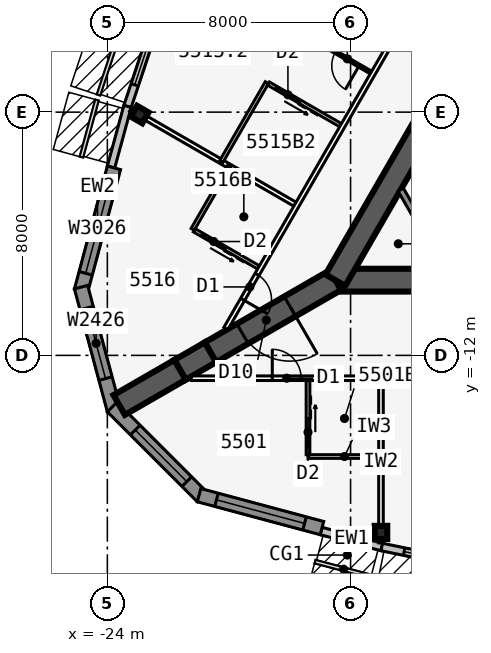
"""IFC4 building model, lengths in metres.
Left out: names, types, materials, properties, quantities, classifications, styles, units other than length and angle.
Written with IfcOpenShell. Run it as: python <this file> out.ifc"""

import sys

from ifc_helpers import new_model, si_unit, direction, frame, frame_2d, origin, origin_2d, place, context, subcontext, project, spatial, polyline, rectangle, i_section, outline, extrude, element, fill, save


model = new_model("IFC4")
c1 = context("Model", 3, precision=1e-05, world=origin(), true_north=direction((0.0, 1.0)))
c2 = subcontext(c1, "Body", "Model", "MODEL_VIEW")
j1 = project(units=[si_unit("LENGTHUNIT", "METRE"), si_unit("PLANEANGLEUNIT", "RADIAN")], contexts=[c1])
p1 = place(None, origin())
s1 = spatial("IfcSite", under=j1, at=p1, CompositionType="ELEMENT")
p2 = place(p1, origin())
s2 = spatial("IfcBuilding", under=s1, at=p2, CompositionType="ELEMENT")
p3 = place(p2, frame((0.0, 0.0, 208.1)))
s3 = spatial("IfcBuildingStorey", under=s2, at=p3, CompositionType="ELEMENT", Elevation=208.1)
p4 = place(p3, frame((-16.5, -9.526, 0.0), z_axis=(0.0, 0.0, 1.0), x_axis=(1.0, 0.0, 0.0)))
e1 = element("IfcWall", 1, at=p4, inside=s3, PredefinedType="SHEAR", context=c2, shape_type="SweptSolid", body=[
    extrude(rectangle(XDim=33.0, YDim=0.75, at=frame_2d((16.5, 0.0))), origin(), (0.0, 0.0, 1.0), 3.6),
])
p5 = place(p4, frame((14.05, 0.0, 0.0)))
e2 = element("IfcOpeningElement", 2, at=p5, cuts=e1, PredefinedType="OPENING", context=c2, shape_type="SweptSolid", body=[
    extrude(rectangle(XDim=1.8, YDim=2.13, at=frame_2d((0.9, 1.065))), frame((0.0, 0.385, 0.0), z_axis=(0.0, -1.0, 0.0), x_axis=(1.0, 0.0, 0.0)), (0.0, 0.0, 1.0), 0.77),
])
p6 = place(p3, frame((0.0, 19.052, 0.0), z_axis=(0.0, 0.0, 1.0), x_axis=(-0.499999749417, -0.866025548458, 0.0)))
e3 = element("IfcWall", 3, at=p6, inside=s3, PredefinedType="SHEAR", context=c2, shape_type="SweptSolid", body=[
    extrude(rectangle(XDim=33.0, YDim=0.75, at=frame_2d((16.5, 0.0))), origin(), (0.0, 0.0, 1.0), 3.6),
])
p7 = place(p6, frame((14.15, 0.0, 0.0)))
e4 = element("IfcOpeningElement", 4, at=p7, cuts=e3, PredefinedType="OPENING", context=c2, shape_type="SweptSolid", body=[
    extrude(rectangle(XDim=1.8, YDim=2.13, at=frame_2d((0.9, 1.065))), frame((0.0, 0.385, 0.0), z_axis=(0.0, -1.0, 0.0), x_axis=(1.0, 0.0, 0.0)), (0.0, 0.0, 1.0), 0.77),
])
p8 = place(p6, frame((12.6, 0.0, 0.0)))
e5 = element("IfcOpeningElement", 5, at=p8, cuts=e3, PredefinedType="OPENING", context=c2, shape_type="SweptSolid", body=[
    extrude(rectangle(XDim=1.0, YDim=2.13, at=frame_2d((0.5, 1.065))), frame((0.0, 0.385, 0.0), z_axis=(0.0, -1.0, 0.0), x_axis=(1.0, 0.0, 0.0)), (0.0, 0.0, 1.0), 0.77),
])
p9 = place(p3, frame((-16.5, -9.526, 0.0), z_axis=(0.0, 0.0, 1.0), x_axis=(-0.866031398331, -0.499989616998, 0.0)))
e6 = element("IfcWall", 6, at=p9, inside=s3, PredefinedType="SHEAR", context=c2, shape_type="SweptSolid", body=[
    extrude(rectangle(XDim=4.746, YDim=0.75, at=frame_2d((2.373, 0.0))), origin(), (0.0, 0.0, 1.0), 3.6),
])
p10 = place(p9, frame((1.725, 0.0, 0.0)))
e7 = element("IfcOpeningElement", 7, at=p10, cuts=e6, PredefinedType="OPENING", context=c2, shape_type="SweptSolid", body=[
    extrude(rectangle(XDim=1.8, YDim=2.13, at=frame_2d((0.9, 1.065))), frame((0.0, 0.385, 0.0), z_axis=(0.0, -1.0, 0.0), x_axis=(1.0, 0.0, 0.0)), (0.0, 0.0, 1.0), 0.77),
])
p11 = place(p3, frame((-20.61, -11.899, 0.0), z_axis=(0.0, 0.0, 1.0), x_axis=(-0.866009537788, -0.500027479704, 0.0)))
e8 = element("IfcWall", 8, at=p11, inside=s3, PredefinedType="SHEAR", context=c2, shape_type="SweptSolid", body=[
    extrude(rectangle(XDim=1.155, YDim=0.75, at=frame_2d((0.577, 0.0))), origin(), (0.0, 0.0, 1.0), 3.6),
])
p12 = place(p3, frame((-21.61, -12.477, 0.0), z_axis=(0.0, 0.0, 1.0), x_axis=(-0.866055313784, -0.499948190782, 0.0)))
e9 = element("IfcWall", 9, at=p12, inside=s3, PredefinedType="SHEAR", context=c2, shape_type="SweptSolid", body=[
    extrude(rectangle(XDim=2.309, YDim=0.75, at=frame_2d((1.155, 0.0))), origin(), (0.0, 0.0, 1.0), 3.6),
])
for number, where, z_axis, x_axis in (
    (10, (-15.0, -17.825, 0.0), (0.0, 0.0, 1.0), (1.0, 0.0, 0.0)),
    (11, (-22.937, -4.078, 0.0), (0.0, 0.0, 1.0), (-0.5, -0.866, 0.0)),
):
    element("IfcColumn", number, at=place(p3, frame(where, z_axis=z_axis, x_axis=x_axis)), inside=s3, PredefinedType="COLUMN", context=c2, shape_type="SweptSolid", body=[
        extrude(i_section(OverallWidth=0.411, OverallDepth=0.434, WebThickness=0.036, FlangeThickness=0.057, at=origin_2d()), origin(), (0.0, 0.0, 1.0), 3.6),
    ])
p13 = place(p3, frame((-16.968, -17.777, 0.0), z_axis=(0.0, 0.0, 1.0), x_axis=(0.967010286052, -0.254737328772, 0.0)))
e12 = element("IfcWall", 12, at=p13, inside=s3, PredefinedType="STANDARD", context=c2, shape_type="SweptSolid", body=[
    extrude(rectangle(XDim=2.068, YDim=0.25, at=frame_2d((1.034, 0.0))), origin(), (0.0, 0.0, 1.0), 3.435),
])
p14 = place(p3, frame((-14.975, -18.302, 0.0), z_axis=(0.0, 0.0, 1.0), x_axis=(0.979461488189, -0.201631329795, 0.0)))
e13 = element("IfcWall", 13, at=p14, inside=s3, PredefinedType="STANDARD", context=c2, shape_type="SweptSolid", body=[
    extrude(rectangle(XDim=5.105, YDim=0.25, at=frame_2d((2.552, 0.0))), origin(), (0.0, 0.0, 1.0), 3.435),
])
p15 = place(p14, frame((0.752, 0.0, 0.45)))
e14 = element("IfcOpeningElement", 14, at=p15, cuts=e13, PredefinedType="OPENING", context=c2, shape_type="SweptSolid", body=[
    extrude(rectangle(XDim=3.6, YDim=2.6, at=frame_2d((1.8, 1.3))), frame((0.0, 0.135, 0.0), z_axis=(0.0, -1.0, 0.0), x_axis=(1.0, 0.0, 0.0)), (0.0, 0.0, 1.0), 0.27),
])
p16 = place(p3, frame((-21.729, 1.028, 0.0), z_axis=(0.0, 0.0, 1.0), x_axis=(-0.315108478109, -0.949055660656, 0.0)))
e15 = element("IfcWall", 15, at=p16, inside=s3, PredefinedType="STANDARD", context=c2, shape_type="SweptSolid", body=[
    extrude(rectangle(XDim=5.105, YDim=0.25, at=frame_2d((2.552, 0.0))), origin(), (0.0, 0.0, 1.0), 3.435),
])
p17 = place(p16, frame((0.752, 0.0, 0.45)))
e16 = element("IfcOpeningElement", 16, at=p17, cuts=e15, PredefinedType="OPENING", context=c2, shape_type="SweptSolid", body=[
    extrude(rectangle(XDim=3.6, YDim=2.6, at=frame_2d((1.8, 1.3))), frame((0.0, 0.135, 0.0), z_axis=(0.0, -1.0, 0.0), x_axis=(1.0, 0.0, 0.0)), (0.0, 0.0, 1.0), 0.27),
])
p18 = place(p3, frame((-23.336, -3.811, 0.0), z_axis=(0.0, 0.0, 1.0), x_axis=(-0.262867703986, -0.964831887015, 0.0)))
e17 = element("IfcWall", 17, at=p18, inside=s3, PredefinedType="STANDARD", context=c2, shape_type="SweptSolid", body=[
    extrude(rectangle(XDim=2.068, YDim=0.25, at=frame_2d((1.034, 0.0))), origin(), (0.0, 0.0, 1.0), 3.435),
])
p19 = place(p3, frame((-23.783, -5.832, 0.0), z_axis=(0.0, 0.0, 1.0), x_axis=(-0.258784695888, -0.965935029479, 0.0)))
e18 = element("IfcWall", 18, at=p19, inside=s3, PredefinedType="SOLIDWALL", context=c2, shape_type="SweptSolid", body=[
    extrude(rectangle(XDim=4.184, YDim=0.45, at=frame_2d((2.092, 0.0))), origin(), (0.0, 0.0, 1.0), 3.435),
])
p20 = place(p19, frame((0.592, 0.0, 0.45)))
e19 = element("IfcOpeningElement", 19, at=p20, cuts=e18, PredefinedType="OPENING", context=c2, shape_type="SweptSolid", body=[
    extrude(rectangle(XDim=3.0, YDim=2.6, at=frame_2d((1.5, 1.3))), frame((0.0, 0.235, 0.0), z_axis=(0.0, -1.0, 0.0), x_axis=(1.0, 0.0, 0.0)), (0.0, 0.0, 1.0), 0.47),
])
p21 = place(p3, frame((-24.865, -9.757, 0.0), z_axis=(0.0, 0.0, 1.0), x_axis=(0.258799282522, -0.96593112144, 0.0)))
e20 = element("IfcWall", 20, at=p21, inside=s3, PredefinedType="SOLIDWALL", context=c2, shape_type="SweptSolid", body=[
    extrude(outline(polyline([(4.184, 0.225), (4.125, 0.225), (3.705, 0.113), (3.675, 0.225), (0.0, 0.225), (0.0, -0.225), (4.184, -0.225), (4.184, 0.225)])), origin(), (0.0, 0.0, 1.0), 3.435),
])
p22 = place(p21, frame((0.713, 0.0, 0.45)))
e21 = element("IfcOpeningElement", 21, at=p22, cuts=e20, PredefinedType="OPENING", context=c2, shape_type="SweptSolid", body=[
    extrude(rectangle(XDim=2.4, YDim=2.6, at=frame_2d((1.2, 1.3))), frame((0.0, 0.235, 0.0), z_axis=(0.0, -1.0, 0.0), x_axis=(1.0, 0.0, 0.0)), (0.0, 0.0, 1.0), 0.47),
])
p23 = place(p3, frame((-23.841, -13.697, 0.0), z_axis=(0.0, 0.0, 1.0), x_axis=(0.707077605902, -0.707135955267, 0.0)))
e22 = element("IfcWall", 22, at=p23, inside=s3, PredefinedType="SOLIDWALL", context=c2, shape_type="SweptSolid", body=[
    extrude(outline(polyline([(4.184, 0.225), (0.509, 0.225), (0.479, 0.113), (0.059, 0.225), (0.0, 0.225), (0.0, -0.225), (4.184, -0.225), (4.184, 0.225)])), origin(), (0.0, 0.0, 1.0), 3.435),
])
p24 = place(p23, frame((1.071, 0.0, 0.45)))
e23 = element("IfcOpeningElement", 23, at=p24, cuts=e22, PredefinedType="OPENING", context=c2, shape_type="SweptSolid", body=[
    extrude(rectangle(XDim=2.4, YDim=2.6, at=frame_2d((1.2, 1.3))), frame((0.0, 0.235, 0.0), z_axis=(0.0, -1.0, 0.0), x_axis=(1.0, 0.0, 0.0)), (0.0, 0.0, 1.0), 0.47),
])
p25 = place(p3, frame((-20.983, -16.598, 0.0), z_axis=(0.0, 0.0, 1.0), x_axis=(0.965920442324, -0.258839137498, 0.0)))
e24 = element("IfcWall", 24, at=p25, inside=s3, PredefinedType="SOLIDWALL", context=c2, shape_type="SweptSolid", body=[
    extrude(rectangle(XDim=4.184, YDim=0.45, at=frame_2d((2.092, 0.0))), origin(), (0.0, 0.0, 1.0), 3.435),
])
p26 = place(p25, frame((0.592, 0.0, 0.45)))
e25 = element("IfcOpeningElement", 25, at=p26, cuts=e24, PredefinedType="OPENING", context=c2, shape_type="SweptSolid", body=[
    extrude(rectangle(XDim=3.0, YDim=2.6, at=frame_2d((1.5, 1.3))), frame((0.0, 0.235, 0.0), z_axis=(0.0, -1.0, 0.0), x_axis=(1.0, 0.0, 0.0)), (0.0, 0.0, 1.0), 0.47),
])
p27 = place(p3, frame((-21.236, -12.751, 0.0), z_axis=(0.0, 0.0, 1.0), x_axis=(1.0, 0.0, 0.0)))
e26 = element("IfcWall", 26, at=p27, inside=s3, PredefinedType="PARTITIONING", context=c2, shape_type="SweptSolid", body=[
    extrude(rectangle(XDim=42.472, YDim=0.15, at=frame_2d((21.236, 0.0))), origin(), (0.0, 0.0, 1.0), 3.435),
])
p28 = place(p27, frame((2.661, 0.0, 0.0)))
e27 = element("IfcOpeningElement", 27, at=p28, cuts=e26, PredefinedType="OPENING", context=c2, shape_type="SweptSolid", body=[
    extrude(rectangle(XDim=0.95, YDim=2.13, at=frame_2d((0.475, 1.065))), frame((0.0, 0.085, 0.0), z_axis=(0.0, -1.0, 0.0), x_axis=(1.0, 0.0, 0.0)), (0.0, 0.0, 1.0), 0.17),
])
p29 = place(p27, frame((8.261, 0.0, 0.0)))
e28 = element("IfcOpeningElement", 28, at=p29, cuts=e26, PredefinedType="OPENING", context=c2, shape_type="SweptSolid", body=[
    extrude(rectangle(XDim=0.95, YDim=2.13, at=frame_2d((0.475, 1.065))), frame((0.0, 0.085, 0.0), z_axis=(0.0, -1.0, 0.0), x_axis=(1.0, 0.0, 0.0)), (0.0, 0.0, 1.0), 0.17),
])
p30 = place(p27, frame((18.861, 0.0, 0.0)))
e29 = element("IfcOpeningElement", 29, at=p30, cuts=e26, PredefinedType="OPENING", context=c2, shape_type="SweptSolid", body=[
    extrude(rectangle(XDim=0.95, YDim=2.13, at=frame_2d((0.475, 1.065))), frame((0.0, 0.085, 0.0), z_axis=(0.0, -1.0, 0.0), x_axis=(1.0, 0.0, 0.0)), (0.0, 0.0, 1.0), 0.17),
])
p31 = place(p27, frame((23.236, 0.0, 0.0)))
e30 = element("IfcOpeningElement", 30, at=p31, cuts=e26, PredefinedType="OPENING", context=c2, shape_type="SweptSolid", body=[
    extrude(rectangle(XDim=1.0, YDim=2.13, at=frame_2d((0.5, 1.065))), frame((0.0, 0.085, 0.0), z_axis=(0.0, -1.0, 0.0), x_axis=(1.0, 0.0, 0.0)), (0.0, 0.0, 1.0), 0.17),
])
p32 = place(p27, frame((29.461, 0.0, 0.0)))
e31 = element("IfcOpeningElement", 31, at=p32, cuts=e26, PredefinedType="OPENING", context=c2, shape_type="SweptSolid", body=[
    extrude(rectangle(XDim=0.95, YDim=2.13, at=frame_2d((0.475, 1.065))), frame((0.0, 0.085, 0.0), z_axis=(0.0, -1.0, 0.0), x_axis=(1.0, 0.0, 0.0)), (0.0, 0.0, 1.0), 0.17),
])
p33 = place(p27, frame((38.861, 0.0, 0.0)))
e32 = element("IfcOpeningElement", 32, at=p33, cuts=e26, PredefinedType="OPENING", context=c2, shape_type="SweptSolid", body=[
    extrude(rectangle(XDim=0.95, YDim=2.13, at=frame_2d((0.475, 1.065))), frame((0.0, 0.085, 0.0), z_axis=(0.0, -1.0, 0.0), x_axis=(1.0, 0.0, 0.0)), (0.0, 0.0, 1.0), 0.17),
])
p34 = place(p3, frame((-15.0, -12.826, 0.0), z_axis=(0.0, 0.0, 1.0), x_axis=(0.0, -1.0, 0.0)))
e33 = element("IfcWall", 33, at=p34, inside=s3, PredefinedType="PARTITIONING", context=c2, shape_type="SweptSolid", body=[
    extrude(rectangle(XDim=5.34, YDim=0.15, at=frame_2d((2.67, 0.0))), origin(), (0.0, 0.0, 1.0), 2.589),
])
p35 = place(p3, frame((-17.4, -15.326, 0.0), z_axis=(0.0, 0.0, 1.0), x_axis=(1.0, 0.0, 0.0)))
e34 = element("IfcWall", 34, at=p35, inside=s3, PredefinedType="PLUMBINGWALL", context=c2, shape_type="SweptSolid", body=[
    extrude(rectangle(XDim=2.4, YDim=0.12, at=frame_2d((1.2, 0.0))), origin(), (0.0, 0.0, 1.0), 3.435),
])
p36 = place(p3, frame((-17.4, -12.826, 0.0), z_axis=(0.0, 0.0, 1.0), x_axis=(0.0, -1.0, 0.0)))
e35 = element("IfcWall", 35, at=p36, inside=s3, PredefinedType="PLUMBINGWALL", context=c2, shape_type="SweptSolid", body=[
    extrude(rectangle(XDim=2.44, YDim=0.12, at=frame_2d((1.22, 0.0))), origin(), (0.0, 0.0, 1.0), 3.435),
])
p37 = place(p36, frame((1.25, 0.0, 0.0)))
e36 = element("IfcOpeningElement", 36, at=p37, cuts=e35, PredefinedType="OPENING", context=c2, shape_type="SweptSolid", body=[
    extrude(rectangle(XDim=0.9, YDim=2.13, at=frame_2d((0.45, 1.065))), frame((0.0, 0.07, 0.0), z_axis=(0.0, -1.0, 0.0), x_axis=(1.0, 0.0, 0.0)), (0.0, 0.0, 1.0), 0.14),
])
p38 = place(p3, frame((-0.425, 22.966, 0.0), z_axis=(0.0, 0.0, 1.0), x_axis=(-0.500000265775, -0.866025250339, 0.0)))
e37 = element("IfcWall", 37, at=p38, inside=s3, PredefinedType="PARTITIONING", context=c2, shape_type="SweptSolid", body=[
    extrude(rectangle(XDim=39.354, YDim=0.15, at=frame_2d((19.677, 0.0))), origin(), (0.0, 0.0, 1.0), 3.435),
])
p39 = place(p38, frame((1.102, 0.0, 0.0)))
e38 = element("IfcOpeningElement", 38, at=p39, cuts=e37, PredefinedType="OPENING", context=c2, shape_type="SweptSolid", body=[
    extrude(rectangle(XDim=0.95, YDim=2.13, at=frame_2d((0.475, 1.065))), frame((0.0, 0.085, 0.0), z_axis=(0.0, -1.0, 0.0), x_axis=(1.0, 0.0, 0.0)), (0.0, 0.0, 1.0), 0.17),
])
p40 = place(p38, frame((7.902, 0.0, 0.0)))
e39 = element("IfcOpeningElement", 39, at=p40, cuts=e37, PredefinedType="OPENING", context=c2, shape_type="SweptSolid", body=[
    extrude(rectangle(XDim=0.95, YDim=2.13, at=frame_2d((0.475, 1.065))), frame((0.0, 0.085, 0.0), z_axis=(0.0, -1.0, 0.0), x_axis=(1.0, 0.0, 0.0)), (0.0, 0.0, 1.0), 0.17),
])
p41 = place(p38, frame((17.302, 0.0, 0.0)))
e40 = element("IfcOpeningElement", 40, at=p41, cuts=e37, PredefinedType="OPENING", context=c2, shape_type="SweptSolid", body=[
    extrude(rectangle(XDim=0.95, YDim=2.13, at=frame_2d((0.475, 1.065))), frame((0.0, 0.085, 0.0), z_axis=(0.0, -1.0, 0.0), x_axis=(1.0, 0.0, 0.0)), (0.0, 0.0, 1.0), 0.17),
])
p42 = place(p38, frame((26.702, 0.0, 0.0)))
e41 = element("IfcOpeningElement", 41, at=p42, cuts=e37, PredefinedType="OPENING", context=c2, shape_type="SweptSolid", body=[
    extrude(rectangle(XDim=0.95, YDim=2.13, at=frame_2d((0.475, 1.065))), frame((0.0, 0.085, 0.0), z_axis=(0.0, -1.0, 0.0), x_axis=(1.0, 0.0, 0.0)), (0.0, 0.0, 1.0), 0.17),
])
p43 = place(p38, frame((37.302, 0.0, 0.0)))
e42 = element("IfcOpeningElement", 42, at=p43, cuts=e37, PredefinedType="OPENING", context=c2, shape_type="SweptSolid", body=[
    extrude(rectangle(XDim=0.95, YDim=2.13, at=frame_2d((0.475, 1.065))), frame((0.0, 0.085, 0.0), z_axis=(0.0, -1.0, 0.0), x_axis=(1.0, 0.0, 0.0)), (0.0, 0.0, 1.0), 0.17),
])
p44 = place(p3, frame((-15.329, -2.697, 0.0), z_axis=(0.0, 0.0, 1.0), x_axis=(-0.866032413668, 0.499987858329, 0.0)))
e43 = element("IfcWall", 43, at=p44, inside=s3, PredefinedType="PARTITIONING", context=c2, shape_type="SweptSolid", body=[
    extrude(rectangle(XDim=7.273, YDim=0.1, at=frame_2d((3.636, 0.0))), origin(), (0.0, 0.0, 1.0), 2.589),
])
p45 = place(p44, frame((0.45, 0.0, 0.0)))
e44 = element("IfcOpeningElement", 44, at=p45, cuts=e43, PredefinedType="OPENING", context=c2, shape_type="SweptSolid", body=[
    extrude(rectangle(XDim=0.9, YDim=2.13, at=frame_2d((0.45, 1.065))), frame((0.0, 0.06, 0.0), z_axis=(0.0, -1.0, 0.0), x_axis=(1.0, 0.0, 0.0)), (0.0, 0.0, 1.0), 0.12),
])
p46 = place(p3, frame((-17.829, -7.027, 0.0), z_axis=(0.0, 0.0, 1.0), x_axis=(-0.866026604282, 0.499997920671, 0.0)))
e45 = element("IfcWall", 45, at=p46, inside=s3, PredefinedType="PARTITIONING", context=c2, shape_type="SweptSolid", body=[
    extrude(rectangle(XDim=6.24, YDim=0.15, at=frame_2d((3.12, 0.0))), origin(), (0.0, 0.0, 1.0), 2.589),
])
p47 = place(p3, frame((-18.753, -3.029, 0.0), z_axis=(0.0, 0.0, 1.0), x_axis=(-0.50002537861, -0.866010750942, 0.0)))
e46 = element("IfcWall", 46, at=p47, inside=s3, PredefinedType="PLUMBINGWALL", context=c2, shape_type="SweptSolid", body=[
    extrude(rectangle(XDim=3.0, YDim=0.12, at=frame_2d((1.5, 0.0))), origin(), (0.0, 0.0, 1.0), 3.435),
])
p48 = place(p3, frame((-16.329, -4.429, 0.0), z_axis=(0.0, 0.0, 1.0), x_axis=(-0.865997131366, 0.500048966069, 0.0)))
e47 = element("IfcWall", 47, at=p48, inside=s3, PredefinedType="PLUMBINGWALL", context=c2, shape_type="SweptSolid", body=[
    extrude(rectangle(XDim=2.74, YDim=0.12, at=frame_2d((1.37, 0.0))), origin(), (0.0, 0.0, 1.0), 3.435),
])
p49 = place(p48, frame((1.55, 0.0, 0.0)))
e48 = element("IfcOpeningElement", 48, at=p49, cuts=e47, PredefinedType="OPENING", context=c2, shape_type="SweptSolid", body=[
    extrude(rectangle(XDim=0.9, YDim=2.13, at=frame_2d((0.45, 1.065))), frame((0.0, 0.07, 0.0), z_axis=(0.0, -1.0, 0.0), x_axis=(1.0, 0.0, 0.0)), (0.0, 0.0, 1.0), 0.14),
])
p50 = place(p3, frame((-19.993, -5.777, 0.0), z_axis=(0.0, 0.0, 1.0), x_axis=(-0.500033551112, -0.866006032174, 0.0)))
e49 = element("IfcWall", 49, at=p50, inside=s3, PredefinedType="PLUMBINGWALL", context=c2, shape_type="SweptSolid", body=[
    extrude(rectangle(XDim=2.4, YDim=0.12, at=frame_2d((1.2, 0.0))), origin(), (0.0, 0.0, 1.0), 3.435),
])
p51 = place(p3, frame((-19.029, -9.106, 0.0), z_axis=(0.0, 0.0, 1.0), x_axis=(-0.866023955769, 0.500002508028, 0.0)))
e50 = element("IfcWall", 50, at=p51, inside=s3, PredefinedType="PLUMBINGWALL", context=c2, shape_type="SweptSolid", body=[
    extrude(rectangle(XDim=2.44, YDim=0.12, at=frame_2d((1.22, 0.0))), origin(), (0.0, 0.0, 1.0), 3.435),
])
p52 = place(p51, frame((1.25, 0.0, 0.0)))
e51 = element("IfcOpeningElement", 51, at=p52, cuts=e50, PredefinedType="OPENING", context=c2, shape_type="SweptSolid", body=[
    extrude(rectangle(XDim=0.9, YDim=2.13, at=frame_2d((0.45, 1.065))), frame((0.0, 0.07, 0.0), z_axis=(0.0, -1.0, 0.0), x_axis=(1.0, 0.0, 0.0)), (0.0, 0.0, 1.0), 0.14),
])
p53 = place(p3, frame((-12.848, -9.151, 0.0), z_axis=(0.0, 0.0, 1.0), x_axis=(-0.499952404951, 0.866052881055, 0.0)))
e52 = element("IfcWall", 52, at=p53, inside=s3, PredefinedType="SOLIDWALL", context=c2, shape_type="SweptSolid", body=[
    extrude(rectangle(XDim=3.002, YDim=0.2, at=frame_2d((1.501, 0.0))), origin(), (0.0, 0.0, 1.0), 3.435),
])
p54 = place(p15, origin())
e53 = element("IfcWindow", 53, at=p54, inside=s3, PartitioningType="SINGLE_PANEL", PredefinedType="WINDOW", context=c2, shape_type="SweptSolid", body=[
    extrude(rectangle(XDim=3.6, YDim=2.6, at=frame_2d((1.8, 1.3))), frame((0.0, 0.03, 0.0), z_axis=(0.0, -1.0, 0.0), x_axis=(1.0, 0.0, 0.0)), (0.0, 0.0, 1.0), 0.06),
])
fill(e14, e53)
p55 = place(p17, origin())
e54 = element("IfcWindow", 54, at=p55, inside=s3, PartitioningType="SINGLE_PANEL", PredefinedType="WINDOW", context=c2, shape_type="SweptSolid", body=[
    extrude(rectangle(XDim=3.6, YDim=2.6, at=frame_2d((1.8, 1.3))), frame((0.0, 0.03, 0.0), z_axis=(0.0, -1.0, 0.0), x_axis=(1.0, 0.0, 0.0)), (0.0, 0.0, 1.0), 0.06),
])
fill(e16, e54)
p56 = place(p20, origin())
e55 = element("IfcWindow", 55, at=p56, inside=s3, PartitioningType="SINGLE_PANEL", PredefinedType="WINDOW", context=c2, shape_type="SweptSolid", body=[
    extrude(rectangle(XDim=3.0, YDim=2.6, at=frame_2d((1.5, 1.3))), frame((0.0, 0.03, 0.0), z_axis=(0.0, -1.0, 0.0), x_axis=(1.0, 0.0, 0.0)), (0.0, 0.0, 1.0), 0.06),
])
fill(e19, e55)
p57 = place(p22, origin())
e56 = element("IfcWindow", 56, at=p57, inside=s3, PartitioningType="SINGLE_PANEL", PredefinedType="WINDOW", context=c2, shape_type="SweptSolid", body=[
    extrude(rectangle(XDim=2.4, YDim=2.6, at=frame_2d((1.2, 1.3))), frame((0.0, 0.03, 0.0), z_axis=(0.0, -1.0, 0.0), x_axis=(1.0, 0.0, 0.0)), (0.0, 0.0, 1.0), 0.06),
])
fill(e21, e56)
p58 = place(p24, origin())
e57 = element("IfcWindow", 57, at=p58, inside=s3, PartitioningType="SINGLE_PANEL", PredefinedType="WINDOW", context=c2, shape_type="SweptSolid", body=[
    extrude(rectangle(XDim=2.4, YDim=2.6, at=frame_2d((1.2, 1.3))), frame((0.0, 0.03, 0.0), z_axis=(0.0, -1.0, 0.0), x_axis=(1.0, 0.0, 0.0)), (0.0, 0.0, 1.0), 0.06),
])
fill(e23, e57)
p59 = place(p26, origin())
e58 = element("IfcWindow", 58, at=p59, inside=s3, PartitioningType="SINGLE_PANEL", PredefinedType="WINDOW", context=c2, shape_type="SweptSolid", body=[
    extrude(rectangle(XDim=3.0, YDim=2.6, at=frame_2d((1.5, 1.3))), frame((0.0, 0.03, 0.0), z_axis=(0.0, -1.0, 0.0), x_axis=(1.0, 0.0, 0.0)), (0.0, 0.0, 1.0), 0.06),
])
fill(e25, e58)
p60 = place(p37, origin())
e59 = element("IfcDoor", 59, at=p60, inside=s3, OperationType="SLIDING_TO_LEFT", PredefinedType="DOOR", context=c2, shape_type="SweptSolid", body=[
    extrude(rectangle(XDim=0.9, YDim=2.13, at=frame_2d((0.45, 1.065))), frame((0.0, 0.025, 0.0), z_axis=(0.0, -1.0, 0.0), x_axis=(1.0, 0.0, 0.0)), (0.0, 0.0, 1.0), 0.05),
])
fill(e36, e59)
p61 = place(p28, origin())
e60 = element("IfcDoor", 60, at=p61, inside=s3, OperationType="SINGLE_SWING_LEFT", PredefinedType="DOOR", context=c2, shape_type="SweptSolid", body=[
    extrude(rectangle(XDim=0.95, YDim=2.13, at=frame_2d((0.475, 1.065))), frame((0.0, 0.025, 0.0), z_axis=(0.0, -1.0, 0.0), x_axis=(1.0, 0.0, 0.0)), (0.0, 0.0, 1.0), 0.05),
])
fill(e27, e60)
p62 = place(p45, origin())
e61 = element("IfcDoor", 61, at=p62, inside=s3, OperationType="SINGLE_SWING_LEFT", PredefinedType="DOOR", context=c2, shape_type="SweptSolid", body=[
    extrude(rectangle(XDim=0.9, YDim=2.13, at=frame_2d((0.45, 1.065))), frame((0.0, 0.025, 0.0), z_axis=(0.0, -1.0, 0.0), x_axis=(1.0, 0.0, 0.0)), (0.0, 0.0, 1.0), 0.05),
])
fill(e44, e61)
p63 = place(p49, origin())
e62 = element("IfcDoor", 62, at=p63, inside=s3, OperationType="SLIDING_TO_LEFT", PredefinedType="DOOR", context=c2, shape_type="SweptSolid", body=[
    extrude(rectangle(XDim=0.9, YDim=2.13, at=frame_2d((0.45, 1.065))), frame((0.0, 0.025, 0.0), z_axis=(0.0, -1.0, 0.0), x_axis=(1.0, 0.0, 0.0)), (0.0, 0.0, 1.0), 0.05),
])
fill(e48, e62)
p64 = place(p52, origin())
e63 = element("IfcDoor", 63, at=p64, inside=s3, OperationType="SLIDING_TO_LEFT", PredefinedType="DOOR", context=c2, shape_type="SweptSolid", body=[
    extrude(rectangle(XDim=0.9, YDim=2.13, at=frame_2d((0.45, 1.065))), frame((0.0, 0.025, 0.0), z_axis=(0.0, -1.0, 0.0), x_axis=(1.0, 0.0, 0.0)), (0.0, 0.0, 1.0), 0.05),
])
fill(e51, e63)
p65 = place(p43, origin())
e64 = element("IfcDoor", 64, at=p65, inside=s3, OperationType="SINGLE_SWING_RIGHT", PredefinedType="DOOR", context=c2, shape_type="SweptSolid", body=[
    extrude(rectangle(XDim=0.95, YDim=2.13, at=frame_2d((0.475, 1.065))), frame((0.0, 0.025, 0.0), z_axis=(0.0, -1.0, 0.0), x_axis=(1.0, 0.0, 0.0)), (0.0, 0.0, 1.0), 0.05),
])
fill(e42, e64)
p66 = place(p10, origin())
e65 = element("IfcDoor", 65, at=p66, inside=s3, OperationType="DOUBLE_DOOR_DOUBLE_SWING", PredefinedType="DOOR", context=c2, shape_type="SweptSolid", body=[
    extrude(rectangle(XDim=1.8, YDim=2.13, at=frame_2d((0.9, 1.065))), frame((0.0, 0.025, 0.0), z_axis=(0.0, -1.0, 0.0), x_axis=(1.0, 0.0, 0.0)), (0.0, 0.0, 1.0), 0.05),
])
fill(e7, e65)
save(model, sys.argv[1])
